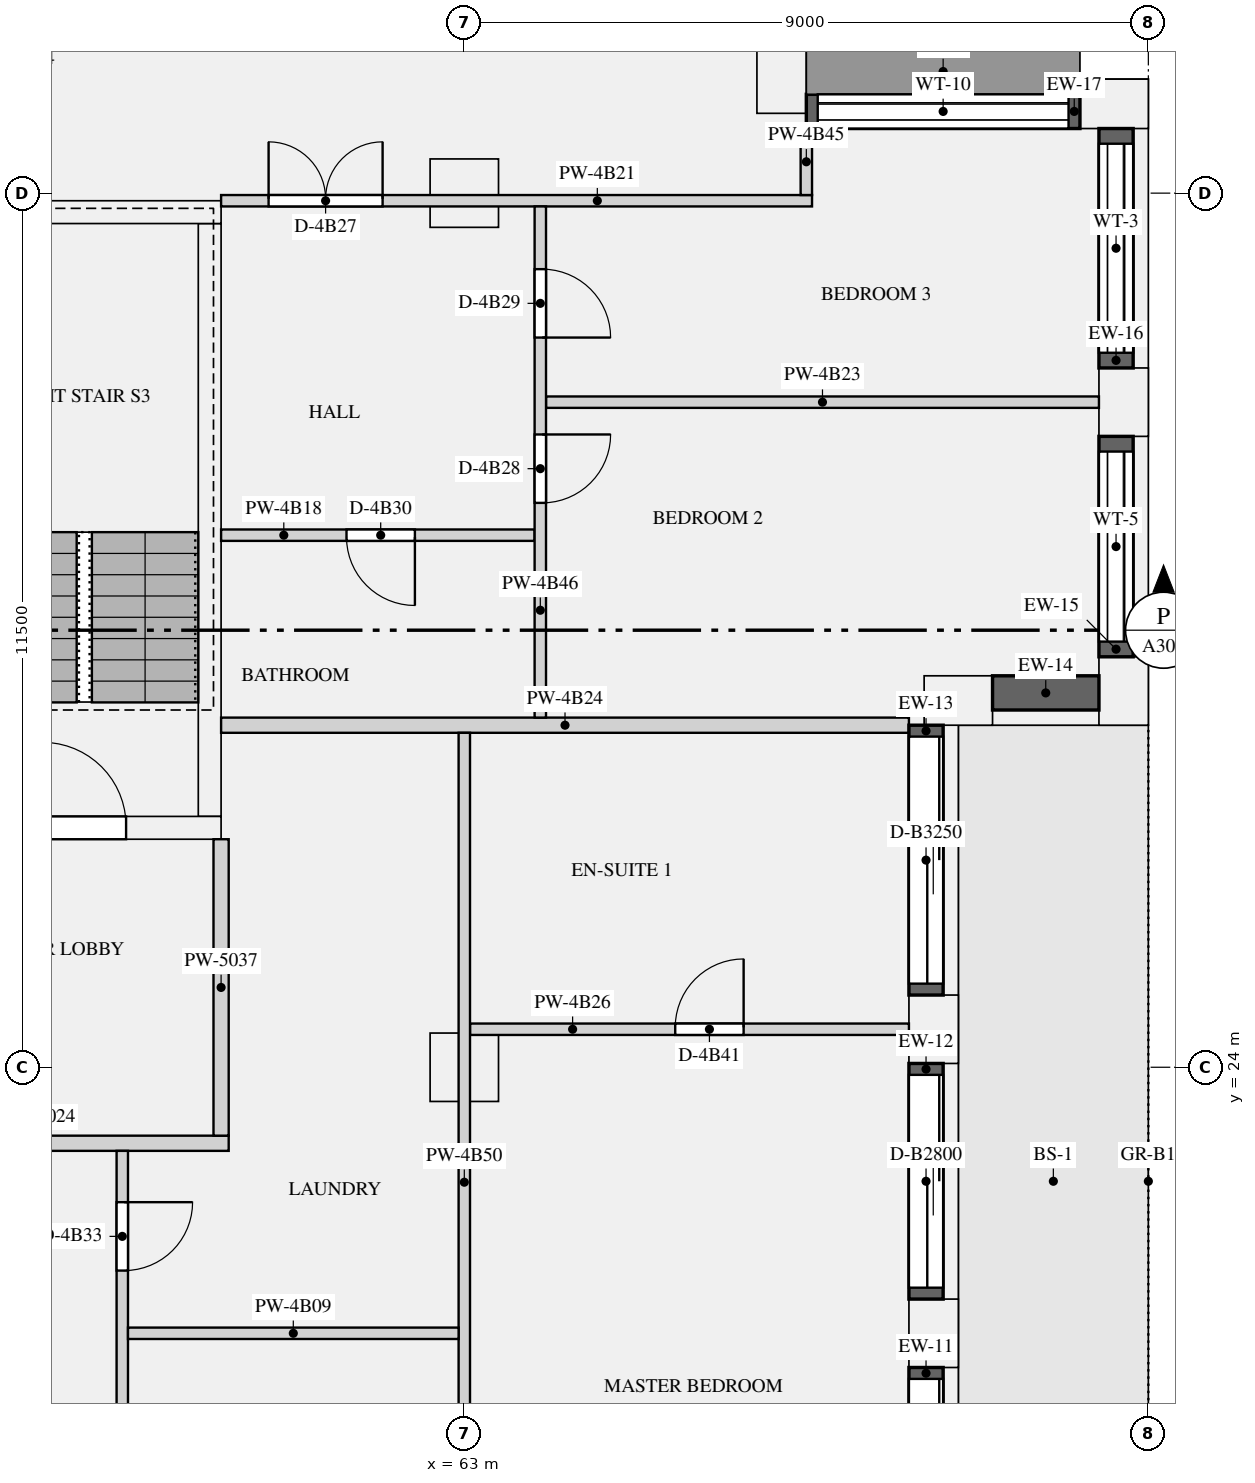
"""IFC4 building model, lengths in metres.
Left out: names, types, materials, properties, quantities, classifications, styles, units other than length and angle.
Written with IfcOpenShell. Run it as: python <this file> out.ifc"""

import sys

from ifc_helpers import new_model, si_unit, direction, frame, frame_2d, origin, origin_2d, place, context, subcontext, project, spatial, rectangle, extrude, element, fill, save


model = new_model("IFC4")
c1 = context("Model", 3, precision=1e-05, world=origin(), true_north=direction((0.0, 1.0)))
c2 = subcontext(c1, "Body", "Model", "MODEL_VIEW")
j1 = project(units=[si_unit("LENGTHUNIT", "METRE"), si_unit("PLANEANGLEUNIT", "RADIAN")], contexts=[c1])
p1 = place(None, origin())
s1 = spatial("IfcSite", under=j1, at=p1, CompositionType="ELEMENT")
p2 = place(p1, origin())
s2 = spatial("IfcBuilding", under=s1, at=p2, CompositionType="ELEMENT")
p3 = place(p2, frame((0.0, 0.0, 207.45)))
s3 = spatial("IfcBuildingStorey", under=s2, at=p3, CompositionType="ELEMENT", Elevation=207.45)
for number, where, z_axis, x_axis in (
    (1, (69.175, 20.5, 0.0), (0.0, 0.0, 1.0), (0.0, 1.0, 0.0)),
    (2, (69.175, 24.5, 0.0), (0.0, 0.0, 1.0), (0.0, 1.0, 0.0)),
    (3, (69.5, 28.825, 0.0), (0.0, 0.0, 1.0), (1.0, 0.0, 0.0)),
    (4, (71.675, 28.95, 0.0), (0.0, 0.0, 1.0), (0.0, 1.0, 0.0)),
    (5, (71.675, 32.75, 0.0), (0.0, 0.0, 1.0), (0.0, 1.0, 0.0)),
    (6, (71.55, 36.675, 0.0), (0.0, 0.0, 1.0), (-1.0, 0.0, 0.0)),
    (7, (67.175, 37.0, 0.0), (0.0, 0.0, 1.0), (0.0, 1.0, 0.0)),
):
    element("IfcColumn", number, at=place(p3, frame(where, z_axis=z_axis, x_axis=x_axis)), inside=s3, PredefinedType="USERDEFINED", context=c2, shape_type="SweptSolid", body=[
        extrude(rectangle(XDim=0.9, YDim=0.65, at=origin_2d()), origin(), (0.0, 0.0, 1.0), 3.15),
    ])
for number, where, z_axis, x_axis in (
    (8, (63.0, 24.0, 0.0), (0.0, 0.0, 1.0), (1.0, 0.0, 0.0)),
    (9, (63.0, 35.5, 0.0), (0.0, 0.0, 1.0), (1.0, 0.0, 0.0)),
):
    element("IfcColumn", number, at=place(p3, frame(where, z_axis=z_axis, x_axis=x_axis)), inside=s3, PredefinedType="COLUMN", context=c2, shape_type="SweptSolid", body=[
        extrude(rectangle(XDim=0.9, YDim=0.9, at=origin_2d()), origin(), (0.0, 0.0, 1.0), 3.15),
    ])
p4 = place(p3, frame((56.2, 27.15, 0.0), z_axis=(0.0, 0.0, 1.0), x_axis=(1.0, 0.0, 0.0)))
e10 = element("IfcWall", 10, at=p4, inside=s3, PredefinedType="SHEAR", context=c2, shape_type="SweptSolid", body=[
    extrude(rectangle(XDim=3.6, YDim=0.3, at=frame_2d((1.8, 0.0))), origin(), (0.0, 0.0, 1.0), 3.15),
])
p5 = place(p4, frame((1.25, 0.0, 0.0)))
e11 = element("IfcOpeningElement", 11, at=p5, cuts=e10, PredefinedType="OPENING", context=c2, shape_type="SweptSolid", body=[
    extrude(rectangle(XDim=1.1, YDim=2.1, at=frame_2d((0.55, 1.05))), frame((0.0, 0.16, 0.0), z_axis=(0.0, -1.0, 0.0), x_axis=(1.0, 0.0, 0.0)), (0.0, 0.0, 1.0), 0.32),
])
p6 = place(p3, frame((56.2, 35.25, 0.0), z_axis=(0.0, 0.0, 1.0), x_axis=(1.0, 0.0, 0.0)))
e12 = element("IfcWall", 12, at=p6, inside=s3, PredefinedType="SHEAR", context=c2, shape_type="SweptSolid", body=[
    extrude(rectangle(XDim=3.6, YDim=0.3, at=frame_2d((1.8, 0.0))), origin(), (0.0, 0.0, 1.0), 3.15),
])
p7 = place(p3, frame((59.65, 27.3, 0.0), z_axis=(0.0, 0.0, 1.0), x_axis=(0.0, 1.0, 0.0)))
e13 = element("IfcWall", 13, at=p7, inside=s3, PredefinedType="SHEAR", context=c2, shape_type="SweptSolid", body=[
    extrude(rectangle(XDim=7.8, YDim=0.3, at=frame_2d((3.9, 0.0))), origin(), (0.0, 0.0, 1.0), 3.15),
])
p8 = place(p3, frame((69.075, 16.95, 0.0), z_axis=(0.0, 0.0, 1.0), x_axis=(0.0, 1.0, 0.0)))
e14 = element("IfcWall", 14, at=p8, inside=s3, PredefinedType="SOLIDWALL", context=c2, shape_type="SweptSolid", body=[
    extrude(rectangle(XDim=3.1, YDim=0.45, at=frame_2d((1.55, 0.0))), origin(), (0.0, 0.0, 1.0), 2.83),
])
p9 = place(p8, frame((0.15, 0.0, 0.0)))
e15 = element("IfcOpeningElement", 15, at=p9, cuts=e14, PredefinedType="OPENING", context=c2, shape_type="SweptSolid", body=[
    extrude(rectangle(XDim=2.8, YDim=2.3, at=frame_2d((1.4, 1.15))), frame((0.0, 0.235, 0.0), z_axis=(0.0, -1.0, 0.0), x_axis=(1.0, 0.0, 0.0)), (0.0, 0.0, 1.0), 0.47),
])
p10 = place(p3, frame((69.075, 20.95, 0.0), z_axis=(0.0, 0.0, 1.0), x_axis=(0.0, 1.0, 0.0)))
e16 = element("IfcWall", 16, at=p10, inside=s3, PredefinedType="SOLIDWALL", context=c2, shape_type="SweptSolid", body=[
    extrude(rectangle(XDim=3.1, YDim=0.45, at=frame_2d((1.55, 0.0))), origin(), (0.0, 0.0, 1.0), 2.83),
])
p11 = place(p10, frame((0.15, 0.0, 0.0)))
e17 = element("IfcOpeningElement", 17, at=p11, cuts=e16, PredefinedType="OPENING", context=c2, shape_type="SweptSolid", body=[
    extrude(rectangle(XDim=2.8, YDim=2.3, at=frame_2d((1.4, 1.15))), frame((0.0, 0.235, 0.0), z_axis=(0.0, -1.0, 0.0), x_axis=(1.0, 0.0, 0.0)), (0.0, 0.0, 1.0), 0.47),
])
p12 = place(p3, frame((69.075, 24.95, 0.0), z_axis=(0.0, 0.0, 1.0), x_axis=(0.0, 1.0, 0.0)))
e18 = element("IfcWall", 18, at=p12, inside=s3, PredefinedType="SOLIDWALL", context=c2, shape_type="SweptSolid", body=[
    extrude(rectangle(XDim=3.55, YDim=0.45, at=frame_2d((1.775, 0.0))), origin(), (0.0, 0.0, 1.0), 2.83),
])
p13 = place(p12, frame((0.15, 0.0, 0.0)))
e19 = element("IfcOpeningElement", 19, at=p13, cuts=e18, PredefinedType="OPENING", context=c2, shape_type="SweptSolid", body=[
    extrude(rectangle(XDim=3.25, YDim=2.3, at=frame_2d((1.625, 1.15))), frame((0.0, 0.235, 0.0), z_axis=(0.0, -1.0, 0.0), x_axis=(1.0, 0.0, 0.0)), (0.0, 0.0, 1.0), 0.47),
])
p14 = place(p3, frame((69.95, 28.925, 0.9), z_axis=(0.0, 0.0, 1.0), x_axis=(1.0, 0.0, 0.0)))
e20 = element("IfcWall", 20, at=p14, inside=s3, PredefinedType="SOLIDWALL", context=c2, shape_type="SweptSolid", body=[
    extrude(rectangle(XDim=1.4, YDim=0.45, at=frame_2d((0.7, 0.0))), origin(), (0.0, 0.0, 1.0), 1.93),
])
p15 = place(p3, frame((71.575, 29.4, 0.9), z_axis=(0.0, 0.0, 1.0), x_axis=(0.0, 1.0, 0.0)))
e21 = element("IfcWall", 21, at=p15, inside=s3, PredefinedType="SOLIDWALL", context=c2, shape_type="SweptSolid", body=[
    extrude(rectangle(XDim=2.9, YDim=0.45, at=frame_2d((1.45, 0.0))), origin(), (0.0, 0.0, 1.0), 1.93),
])
p16 = place(p15, frame((0.2, 0.0, 0.15)))
e22 = element("IfcOpeningElement", 22, at=p16, cuts=e21, PredefinedType="OPENING", context=c2, shape_type="SweptSolid", body=[
    extrude(rectangle(XDim=2.5, YDim=1.5, at=frame_2d((1.25, 0.75))), frame((0.0, 0.235, 0.0), z_axis=(0.0, -1.0, 0.0), x_axis=(1.0, 0.0, 0.0)), (0.0, 0.0, 1.0), 0.47),
])
p17 = place(p3, frame((71.575, 33.2, 0.9), z_axis=(0.0, 0.0, 1.0), x_axis=(0.0, 1.0, 0.0)))
e23 = element("IfcWall", 23, at=p17, inside=s3, PredefinedType="SOLIDWALL", context=c2, shape_type="SweptSolid", body=[
    extrude(rectangle(XDim=3.15, YDim=0.45, at=frame_2d((1.575, 0.0))), origin(), (0.0, 0.0, 1.0), 1.93),
])
p18 = place(p17, frame((0.2, 0.0, 0.15)))
e24 = element("IfcOpeningElement", 24, at=p18, cuts=e23, PredefinedType="OPENING", context=c2, shape_type="SweptSolid", body=[
    extrude(rectangle(XDim=2.75, YDim=1.5, at=frame_2d((1.375, 0.75))), frame((0.0, 0.235, 0.0), z_axis=(0.0, -1.0, 0.0), x_axis=(1.0, 0.0, 0.0)), (0.0, 0.0, 1.0), 0.47),
])
p19 = place(p3, frame((71.1, 36.575, 0.9), z_axis=(0.0, 0.0, 1.0), x_axis=(-1.0, 0.0, 0.0)))
e25 = element("IfcWall", 25, at=p19, inside=s3, PredefinedType="SOLIDWALL", context=c2, shape_type="SweptSolid", body=[
    extrude(rectangle(XDim=3.6, YDim=0.45, at=frame_2d((1.8, 0.0))), origin(), (0.0, 0.0, 1.0), 1.93),
])
p20 = place(p19, frame((0.15, 0.0, 0.15)))
e26 = element("IfcOpeningElement", 26, at=p20, cuts=e25, PredefinedType="OPENING", context=c2, shape_type="SweptSolid", body=[
    extrude(rectangle(XDim=3.3, YDim=1.5, at=frame_2d((1.65, 0.75))), frame((0.0, 0.235, 0.0), z_axis=(0.0, -1.0, 0.0), x_axis=(1.0, 0.0, 0.0)), (0.0, 0.0, 1.0), 0.47),
])
p21 = place(p3, frame((54.9, 23.0, 0.0), z_axis=(0.0, 0.0, 1.0), x_axis=(1.0, 0.0, 0.0)))
e27 = element("IfcWall", 27, at=p21, inside=s3, PredefinedType="PARTITIONING", context=c2, shape_type="SweptSolid", body=[
    extrude(rectangle(XDim=5.0, YDim=0.2, at=frame_2d((2.5, 0.0))), origin(), (0.0, 0.0, 1.0), 2.83),
])
p22 = place(p3, frame((59.8, 23.1, 0.0), z_axis=(0.0, 0.0, 1.0), x_axis=(0.0, 1.0, 0.0)))
e28 = element("IfcWall", 28, at=p22, inside=s3, PredefinedType="PARTITIONING", context=c2, shape_type="SweptSolid", body=[
    extrude(rectangle(XDim=3.9, YDim=0.2, at=frame_2d((1.95, 0.0))), origin(), (0.0, 0.0, 1.0), 2.83),
])
p23 = place(p3, frame((58.575, 20.5, 0.0), z_axis=(0.0, 0.0, 1.0), x_axis=(1.0, 0.0, 0.0)))
e29 = element("IfcWall", 29, at=p23, inside=s3, PredefinedType="PARTITIONING", context=c2, shape_type="SweptSolid", body=[
    extrude(rectangle(XDim=4.35, YDim=0.15, at=frame_2d((2.175, 0.0))), origin(), (0.0, 0.0, 1.0), 2.83),
])
p24 = place(p3, frame((59.8, 31.0, 0.0), z_axis=(0.0, 0.0, 1.0), x_axis=(1.0, 0.0, 0.0)))
e30 = element("IfcWall", 30, at=p24, inside=s3, PredefinedType="PARTITIONING", context=c2, shape_type="SweptSolid", body=[
    extrude(rectangle(XDim=4.125, YDim=0.15, at=frame_2d((2.062, 0.0))), origin(), (0.0, 0.0, 1.0), 2.83),
])
p25 = place(p24, frame((1.65, 0.0, 0.0)))
e31 = element("IfcOpeningElement", 31, at=p25, cuts=e30, PredefinedType="OPENING", context=c2, shape_type="SweptSolid", body=[
    extrude(rectangle(XDim=0.9, YDim=2.1, at=frame_2d((0.45, 1.05))), frame((0.0, 0.085, 0.0), z_axis=(0.0, -1.0, 0.0), x_axis=(1.0, 0.0, 0.0)), (0.0, 0.0, 1.0), 0.17),
])
p26 = place(p3, frame((59.8, 35.4, 0.0), z_axis=(0.0, 0.0, 1.0), x_axis=(1.0, 0.0, 0.0)))
e32 = element("IfcWall", 32, at=p26, inside=s3, PredefinedType="PARTITIONING", context=c2, shape_type="SweptSolid", body=[
    extrude(rectangle(XDim=7.775, YDim=0.15, at=frame_2d((3.887, 0.0))), origin(), (0.0, 0.0, 1.0), 2.83),
])
p27 = place(p26, frame((0.625, 0.0, 0.0)))
e33 = element("IfcOpeningElement", 33, at=p27, cuts=e32, PredefinedType="OPENING", context=c2, shape_type="SweptSolid", body=[
    extrude(rectangle(XDim=1.5, YDim=2.1, at=frame_2d((0.75, 1.05))), frame((0.0, 0.085, 0.0), z_axis=(0.0, -1.0, 0.0), x_axis=(1.0, 0.0, 0.0)), (0.0, 0.0, 1.0), 0.17),
])
p28 = place(p3, frame((64.075, 32.75, 0.0), z_axis=(0.0, 0.0, 1.0), x_axis=(1.0, 0.0, 0.0)))
e34 = element("IfcWall", 34, at=p28, inside=s3, PredefinedType="PARTITIONING", context=c2, shape_type="SweptSolid", body=[
    extrude(rectangle(XDim=7.275, YDim=0.15, at=frame_2d((3.638, 0.0))), origin(), (0.0, 0.0, 1.0), 2.83),
])
p29 = place(p3, frame((59.8, 28.5, 0.0), z_axis=(0.0, 0.0, 1.0), x_axis=(1.0, 0.0, 0.0)))
e35 = element("IfcWall", 35, at=p29, inside=s3, PredefinedType="PARTITIONING", context=c2, shape_type="SweptSolid", body=[
    extrude(rectangle(XDim=9.05, YDim=0.2, at=frame_2d((4.525, 0.0))), origin(), (0.0, 0.0, 1.0), 2.83),
])
p30 = place(p3, frame((63.075, 24.5, 0.0), z_axis=(0.0, 0.0, 1.0), x_axis=(1.0, 0.0, 0.0)))
e36 = element("IfcWall", 36, at=p30, inside=s3, PredefinedType="PARTITIONING", context=c2, shape_type="SweptSolid", body=[
    extrude(rectangle(XDim=5.775, YDim=0.15, at=frame_2d((2.888, 0.0))), origin(), (0.0, 0.0, 1.0), 2.83),
])
p31 = place(p30, frame((2.7, 0.0, 0.0)))
e37 = element("IfcOpeningElement", 37, at=p31, cuts=e36, PredefinedType="OPENING", context=c2, shape_type="SweptSolid", body=[
    extrude(rectangle(XDim=0.9, YDim=2.1, at=frame_2d((0.45, 1.05))), frame((0.0, 0.085, 0.0), z_axis=(0.0, -1.0, 0.0), x_axis=(1.0, 0.0, 0.0)), (0.0, 0.0, 1.0), 0.17),
])
p32 = place(p3, frame((67.5, 35.475, 0.0), z_axis=(0.0, 0.0, 1.0), x_axis=(0.0, 1.0, 0.0)))
e38 = element("IfcWall", 38, at=p32, inside=s3, PredefinedType="PARTITIONING", context=c2, shape_type="SweptSolid", body=[
    extrude(rectangle(XDim=0.875, YDim=0.15, at=frame_2d((0.438, 0.0))), origin(), (0.0, 0.0, 1.0), 2.83),
])
p33 = place(p3, frame((64.0, 28.6, 0.0), z_axis=(0.0, 0.0, 1.0), x_axis=(0.0, 1.0, 0.0)))
e39 = element("IfcWall", 39, at=p33, inside=s3, PredefinedType="PARTITIONING", context=c2, shape_type="SweptSolid", body=[
    extrude(rectangle(XDim=6.725, YDim=0.15, at=frame_2d((3.362, 0.0))), origin(), (0.0, 0.0, 1.0), 2.83),
])
p34 = place(p33, frame((2.825, 0.0, 0.0)))
e40 = element("IfcOpeningElement", 40, at=p34, cuts=e39, PredefinedType="OPENING", context=c2, shape_type="SweptSolid", body=[
    extrude(rectangle(XDim=0.9, YDim=2.1, at=frame_2d((0.45, 1.05))), frame((0.0, 0.085, 0.0), z_axis=(0.0, -1.0, 0.0), x_axis=(1.0, 0.0, 0.0)), (0.0, 0.0, 1.0), 0.17),
])
p35 = place(p33, frame((5.0, 0.0, 0.0)))
e41 = element("IfcOpeningElement", 41, at=p35, cuts=e39, PredefinedType="OPENING", context=c2, shape_type="SweptSolid", body=[
    extrude(rectangle(XDim=0.9, YDim=2.1, at=frame_2d((0.45, 1.05))), frame((0.0, 0.085, 0.0), z_axis=(0.0, -1.0, 0.0), x_axis=(1.0, 0.0, 0.0)), (0.0, 0.0, 1.0), 0.17),
])
p36 = place(p3, frame((63.0, 16.575, 0.0), z_axis=(0.0, 0.0, 1.0), x_axis=(0.0, 1.0, 0.0)))
e42 = element("IfcWall", 42, at=p36, inside=s3, PredefinedType="PARTITIONING", context=c2, shape_type="SweptSolid", body=[
    extrude(rectangle(XDim=11.825, YDim=0.15, at=frame_2d((5.913, 0.0))), origin(), (0.0, 0.0, 1.0), 2.83),
])
p37 = place(p3, frame((58.5, 16.575, 0.0), z_axis=(0.0, 0.0, 1.0), x_axis=(0.0, 1.0, 0.0)))
e43 = element("IfcWall", 43, at=p37, inside=s3, PredefinedType="PARTITIONING", context=c2, shape_type="SweptSolid", body=[
    extrude(rectangle(XDim=6.325, YDim=0.15, at=frame_2d((3.163, 0.0))), origin(), (0.0, 0.0, 1.0), 2.83),
])
p38 = place(p37, frame((4.75, 0.0, 0.0)))
e44 = element("IfcOpeningElement", 44, at=p38, cuts=e43, PredefinedType="OPENING", context=c2, shape_type="SweptSolid", body=[
    extrude(rectangle(XDim=0.9, YDim=2.1, at=frame_2d((0.45, 1.05))), frame((0.0, 0.085, 0.0), z_axis=(0.0, -1.0, 0.0), x_axis=(1.0, 0.0, 0.0)), (0.0, 0.0, 1.0), 0.17),
])
p39 = place(p9, origin())
e45 = element("IfcDoor", 45, at=p39, inside=s3, OperationType="SLIDING_TO_LEFT", PredefinedType="DOOR", context=c2, shape_type="SweptSolid", body=[
    extrude(rectangle(XDim=2.8, YDim=2.3, at=frame_2d((1.4, 1.15))), frame((0.0, -0.07, 0.0), z_axis=(0.0, -1.0, 0.0), x_axis=(1.0, 0.0, 0.0)), (0.0, 0.0, 1.0), 0.05),
])
fill(e15, e45)
p40 = place(p11, origin())
e46 = element("IfcDoor", 46, at=p40, inside=s3, OperationType="SLIDING_TO_LEFT", PredefinedType="DOOR", context=c2, shape_type="SweptSolid", body=[
    extrude(rectangle(XDim=2.8, YDim=2.3, at=frame_2d((1.4, 1.15))), frame((0.0, -0.07, 0.0), z_axis=(0.0, -1.0, 0.0), x_axis=(1.0, 0.0, 0.0)), (0.0, 0.0, 1.0), 0.05),
])
fill(e17, e46)
p41 = place(p13, origin())
e47 = element("IfcDoor", 47, at=p41, inside=s3, OperationType="SLIDING_TO_LEFT", PredefinedType="DOOR", context=c2, shape_type="SweptSolid", body=[
    extrude(rectangle(XDim=3.25, YDim=2.3, at=frame_2d((1.625, 1.15))), frame((0.0, -0.07, 0.0), z_axis=(0.0, -1.0, 0.0), x_axis=(1.0, 0.0, 0.0)), (0.0, 0.0, 1.0), 0.05),
])
fill(e19, e47)
p42 = place(p16, origin())
e48 = element("IfcWindow", 48, at=p42, inside=s3, PartitioningType="SINGLE_PANEL", PredefinedType="WINDOW", context=c2, shape_type="SweptSolid", body=[
    extrude(rectangle(XDim=2.5, YDim=1.5, at=frame_2d((1.25, 0.75))), frame((0.0, -0.065, 0.0), z_axis=(0.0, -1.0, 0.0), x_axis=(1.0, 0.0, 0.0)), (0.0, 0.0, 1.0), 0.06),
])
fill(e22, e48)
p43 = place(p18, origin())
e49 = element("IfcWindow", 49, at=p43, inside=s3, PartitioningType="SINGLE_PANEL", PredefinedType="WINDOW", context=c2, shape_type="SweptSolid", body=[
    extrude(rectangle(XDim=2.75, YDim=1.5, at=frame_2d((1.375, 0.75))), frame((0.0, -0.065, 0.0), z_axis=(0.0, -1.0, 0.0), x_axis=(1.0, 0.0, 0.0)), (0.0, 0.0, 1.0), 0.06),
])
fill(e24, e49)
p44 = place(p20, origin())
e50 = element("IfcWindow", 50, at=p44, inside=s3, PartitioningType="SINGLE_PANEL", PredefinedType="WINDOW", context=c2, shape_type="SweptSolid", body=[
    extrude(rectangle(XDim=3.3, YDim=1.5, at=frame_2d((1.65, 0.75))), frame((0.0, -0.065, 0.0), z_axis=(0.0, -1.0, 0.0), x_axis=(1.0, 0.0, 0.0)), (0.0, 0.0, 1.0), 0.06),
])
fill(e26, e50)
p45 = place(p5, origin())
e51 = element("IfcDoor", 51, at=p45, inside=s3, OperationType="SINGLE_SWING_LEFT", PredefinedType="DOOR", context=c2, shape_type="SweptSolid", body=[
    extrude(rectangle(XDim=1.1, YDim=2.1, at=frame_2d((0.55, 1.05))), frame((0.0, 0.025, 0.0), z_axis=(0.0, -1.0, 0.0), x_axis=(1.0, 0.0, 0.0)), (0.0, 0.0, 1.0), 0.05),
])
fill(e11, e51)
p46 = place(p27, origin())
e52 = element("IfcDoor", 52, at=p46, inside=s3, OperationType="DOUBLE_DOOR_SINGLE_SWING", PredefinedType="DOOR", context=c2, shape_type="SweptSolid", body=[
    extrude(rectangle(XDim=1.5, YDim=2.1, at=frame_2d((0.75, 1.05))), frame((0.0, 0.025, 0.0), z_axis=(0.0, -1.0, 0.0), x_axis=(1.0, 0.0, 0.0)), (0.0, 0.0, 1.0), 0.05),
])
fill(e33, e52)
p47 = place(p34, frame((0.9, 0.0, 0.0), z_axis=(0.0, 0.0, 1.0), x_axis=(-1.0, 0.0, 0.0)))
e53 = element("IfcDoor", 53, at=p47, inside=s3, OperationType="SINGLE_SWING_LEFT", PredefinedType="DOOR", context=c2, shape_type="SweptSolid", body=[
    extrude(rectangle(XDim=0.9, YDim=2.1, at=frame_2d((0.45, 1.05))), frame((0.0, 0.025, 0.0), z_axis=(0.0, -1.0, 0.0), x_axis=(1.0, 0.0, 0.0)), (0.0, 0.0, 1.0), 0.05),
])
fill(e40, e53)
p48 = place(p35, frame((0.9, 0.0, 0.0), z_axis=(0.0, 0.0, 1.0), x_axis=(-1.0, 0.0, 0.0)))
e54 = element("IfcDoor", 54, at=p48, inside=s3, OperationType="SINGLE_SWING_RIGHT", PredefinedType="DOOR", context=c2, shape_type="SweptSolid", body=[
    extrude(rectangle(XDim=0.9, YDim=2.1, at=frame_2d((0.45, 1.05))), frame((0.0, 0.025, 0.0), z_axis=(0.0, -1.0, 0.0), x_axis=(1.0, 0.0, 0.0)), (0.0, 0.0, 1.0), 0.05),
])
fill(e41, e54)
p49 = place(p25, frame((0.9, 0.0, 0.0), z_axis=(0.0, 0.0, 1.0), x_axis=(-1.0, 0.0, 0.0)))
e55 = element("IfcDoor", 55, at=p49, inside=s3, OperationType="SINGLE_SWING_LEFT", PredefinedType="DOOR", context=c2, shape_type="SweptSolid", body=[
    extrude(rectangle(XDim=0.9, YDim=2.1, at=frame_2d((0.45, 1.05))), frame((0.0, 0.025, 0.0), z_axis=(0.0, -1.0, 0.0), x_axis=(1.0, 0.0, 0.0)), (0.0, 0.0, 1.0), 0.05),
])
fill(e31, e55)
p50 = place(p38, frame((0.9, 0.0, 0.0), z_axis=(0.0, 0.0, 1.0), x_axis=(-1.0, 0.0, 0.0)))
e56 = element("IfcDoor", 56, at=p50, inside=s3, OperationType="SINGLE_SWING_LEFT", PredefinedType="DOOR", context=c2, shape_type="SweptSolid", body=[
    extrude(rectangle(XDim=0.9, YDim=2.1, at=frame_2d((0.45, 1.05))), frame((0.0, 0.025, 0.0), z_axis=(0.0, -1.0, 0.0), x_axis=(1.0, 0.0, 0.0)), (0.0, 0.0, 1.0), 0.05),
])
fill(e44, e56)
p51 = place(p31, origin())
e57 = element("IfcDoor", 57, at=p51, inside=s3, OperationType="SINGLE_SWING_RIGHT", PredefinedType="DOOR", context=c2, shape_type="SweptSolid", body=[
    extrude(rectangle(XDim=0.9, YDim=2.1, at=frame_2d((0.45, 1.05))), frame((0.0, 0.025, 0.0), z_axis=(0.0, -1.0, 0.0), x_axis=(1.0, 0.0, 0.0)), (0.0, 0.0, 1.0), 0.05),
])
fill(e37, e57)
save(model, sys.argv[1])
